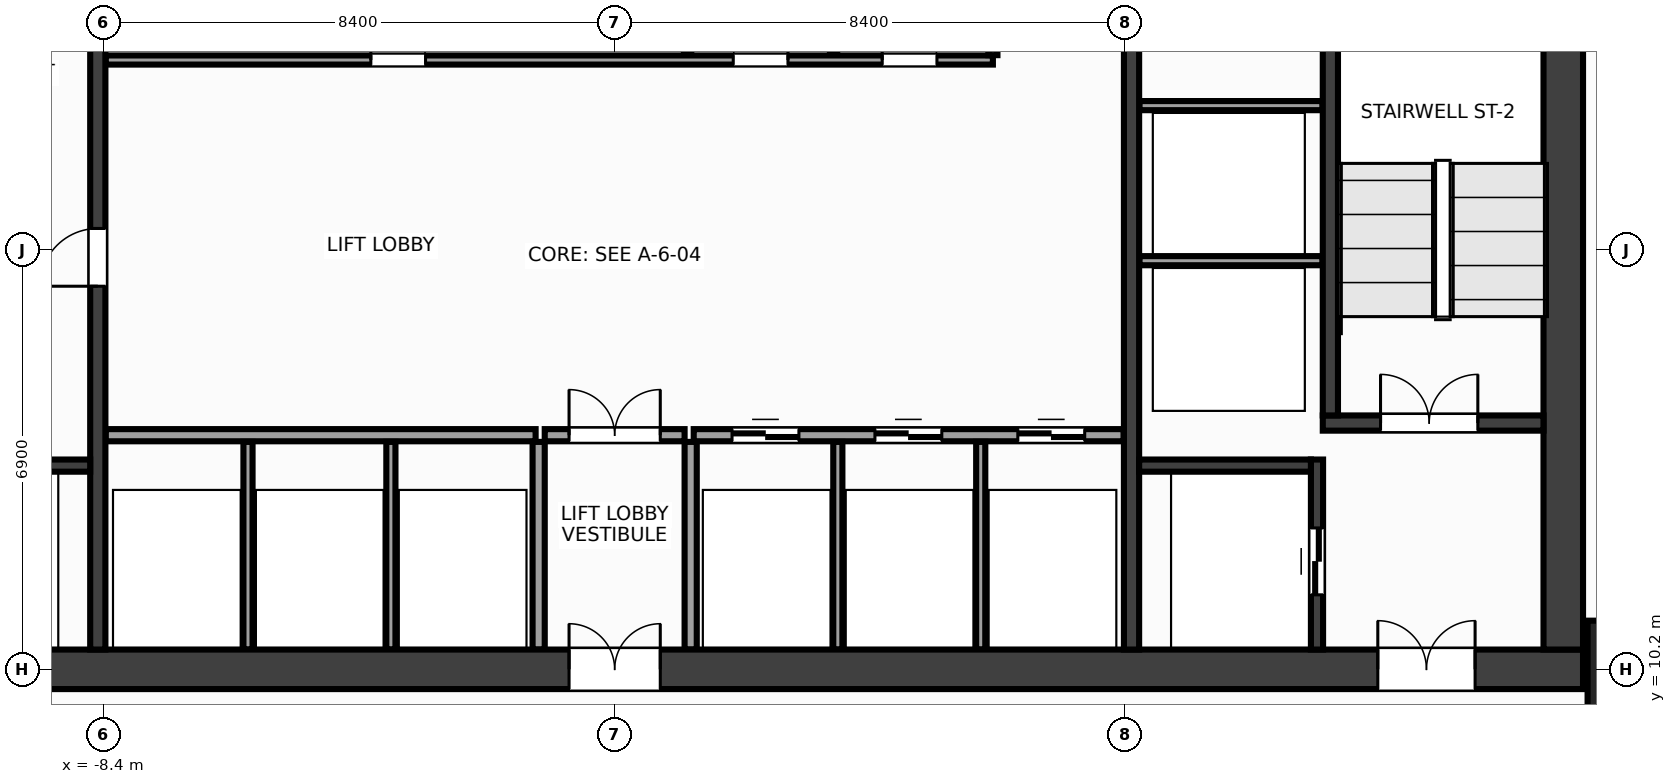
"""IFC4 building model, lengths in metres.
Left out: names, types, materials, properties, quantities, classifications, styles, units other than length and angle.
Written with IfcOpenShell. Run it as: python <this file> out.ifc"""

import sys

from ifc_helpers import new_model, si_unit, direction, frame, frame_2d, origin, origin_2d, place, context, subcontext, project, spatial, rectangle, extrude, source, transform, mapped, element, fill, save


model = new_model("IFC4")
c1 = context("Model", 3, precision=1e-05, world=origin(), true_north=direction((0.0, 1.0)))
c2 = subcontext(c1, "Body", "Model", "MODEL_VIEW")
j1 = project(units=[si_unit("LENGTHUNIT", "METRE"), si_unit("PLANEANGLEUNIT", "RADIAN")], contexts=[c1])
p1 = place(None, origin())
s1 = spatial("IfcSite", under=j1, at=p1, CompositionType="ELEMENT")
p2 = place(p1, origin())
s2 = spatial("IfcBuilding", under=s1, at=p2, CompositionType="ELEMENT")
p3 = place(p2, frame((0.0, 0.0, 81.2)))
s3 = spatial("IfcBuildingStorey", under=s2, at=p3, CompositionType="ELEMENT", Elevation=81.2)
m1 = source(origin(), c2, "Body", "SweptSolid", [
    extrude(rectangle(XDim=31.85, YDim=0.65, at=frame_2d((15.925, 0.0))), origin(), (0.0, 0.0, 1.0), 3.6),
])
p4 = place(p3, frame((-15.925, 10.2, 0.0), z_axis=(0.0, 0.0, 1.0), x_axis=(1.0, 0.0, 0.0)))
e1 = element("IfcWall", 1, at=p4, inside=s3, PredefinedType="SHEAR", context=c2, shape_type="MappedRepresentation", body=[
    mapped(m1, transform((0.0, 0.0, 0.0), x_axis=(1.0, 0.0, 0.0), y_axis=(0.0, 1.0, 0.0), z_axis=(0.0, 0.0, 1.0), scale=1.0)),
])
p5 = place(p4, frame((1.775, 0.0, 0.0)))
e2 = element("IfcOpeningElement", 2, at=p5, cuts=e1, PredefinedType="OPENING", context=c2, shape_type="SweptSolid", body=[
    extrude(rectangle(XDim=1.6, YDim=2.15, at=frame_2d((0.8, 1.075))), frame((0.0, 0.337, 0.0), z_axis=(0.0, -1.0, 0.0), x_axis=(1.0, 0.0, 0.0)), (0.0, 0.0, 1.0), 0.674),
])
p6 = place(p4, frame((28.475, 0.0, 0.0)))
e3 = element("IfcOpeningElement", 3, at=p6, cuts=e1, PredefinedType="OPENING", context=c2, shape_type="SweptSolid", body=[
    extrude(rectangle(XDim=1.6, YDim=2.15, at=frame_2d((0.8, 1.075))), frame((0.0, 0.337, 0.0), z_axis=(0.0, -1.0, 0.0), x_axis=(1.0, 0.0, 0.0)), (0.0, 0.0, 1.0), 0.674),
])
p7 = place(p4, frame((15.175, 0.0, 0.0)))
e4 = element("IfcOpeningElement", 4, at=p7, cuts=e1, PredefinedType="OPENING", context=c2, shape_type="SweptSolid", body=[
    extrude(rectangle(XDim=1.5, YDim=2.2, at=frame_2d((0.75, 1.1))), frame((0.0, 0.337, 0.0), z_axis=(0.0, -1.0, 0.0), x_axis=(1.0, 0.0, 0.0)), (0.0, 0.0, 1.0), 0.674),
])
m2 = source(origin(), c2, "Body", "SweptSolid", [
    extrude(rectangle(XDim=12.95, YDim=0.65, at=frame_2d((6.475, 0.0))), origin(), (0.0, 0.0, 1.0), 3.6),
])
p8 = place(p3, frame((15.6, 10.525, 0.0), z_axis=(0.0, 0.0, 1.0), x_axis=(0.0, 1.0, 0.0)))
e5 = element("IfcWall", 5, at=p8, inside=s3, PredefinedType="SHEAR", context=c2, shape_type="MappedRepresentation", body=[
    mapped(m2, transform((0.0, 0.0, 0.0), x_axis=(1.0, 0.0, 0.0), y_axis=(0.0, 1.0, 0.0), z_axis=(0.0, 0.0, 1.0), scale=1.0)),
])
m3 = source(origin(), c2, "Body", "SweptSolid", [
    extrude(rectangle(XDim=12.95, YDim=0.25, at=frame_2d((6.475, 0.0))), origin(), (0.0, 0.0, 1.0), 3.6),
])
p9 = place(p3, frame((-8.5, 10.525, 0.0), z_axis=(0.0, 0.0, 1.0), x_axis=(0.0, 1.0, 0.0)))
e6 = element("IfcWall", 6, at=p9, inside=s3, PredefinedType="SHEAR", context=c2, shape_type="MappedRepresentation", body=[
    mapped(m3, transform((0.0, 0.0, 0.0), x_axis=(1.0, 0.0, 0.0), y_axis=(0.0, 1.0, 0.0), z_axis=(0.0, 0.0, 1.0), scale=1.0)),
])
p10 = place(p9, frame((5.975, 0.0, 0.0)))
e7 = element("IfcOpeningElement", 7, at=p10, cuts=e6, PredefinedType="OPENING", context=c2, shape_type="SweptSolid", body=[
    extrude(rectangle(XDim=0.95, YDim=2.15, at=frame_2d((0.475, 1.075))), frame((0.0, 0.137, 0.0), z_axis=(0.0, -1.0, 0.0), x_axis=(1.0, 0.0, 0.0)), (0.0, 0.0, 1.0), 0.274),
])
p11 = place(p3, frame((8.5, 10.525, 0.0), z_axis=(0.0, 0.0, 1.0), x_axis=(0.0, 1.0, 0.0)))
e8 = element("IfcWall", 8, at=p11, inside=s3, PredefinedType="SHEAR", context=c2, shape_type="MappedRepresentation", body=[
    mapped(m3, transform((0.0, 0.0, 0.0), x_axis=(1.0, 0.0, 0.0), y_axis=(0.0, 1.0, 0.0), z_axis=(0.0, 0.0, 1.0), scale=1.0)),
])
p12 = place(p11, frame((9.925, 0.0, 0.0)))
e9 = element("IfcOpeningElement", 9, at=p12, cuts=e8, PredefinedType="OPENING", context=c2, shape_type="SweptSolid", body=[
    extrude(rectangle(XDim=0.95, YDim=2.15, at=frame_2d((0.475, 1.075))), frame((0.0, 0.137, 0.0), z_axis=(0.0, -1.0, 0.0), x_axis=(1.0, 0.0, 0.0)), (0.0, 0.0, 1.0), 0.274),
])
m4 = source(origin(), c2, "Body", "SweptSolid", [
    extrude(rectangle(XDim=3.63, YDim=0.25, at=frame_2d((1.815, 0.0))), origin(), (0.0, 0.0, 1.0), 3.6),
])
p13 = place(p3, frame((11.645, 14.25, 0.0), z_axis=(0.0, 0.0, 1.0), x_axis=(1.0, 0.0, 0.0)))
e10 = element("IfcWall", 10, at=p13, inside=s3, PredefinedType="SHEAR", context=c2, shape_type="MappedRepresentation", body=[
    mapped(m4, transform((0.0, 0.0, 0.0), x_axis=(1.0, 0.0, 0.0), y_axis=(0.0, 1.0, 0.0), z_axis=(0.0, 0.0, 1.0), scale=1.0)),
])
p14 = place(p13, frame((0.95, 0.0, 0.0)))
e11 = element("IfcOpeningElement", 11, at=p14, cuts=e10, PredefinedType="OPENING", context=c2, shape_type="SweptSolid", body=[
    extrude(rectangle(XDim=1.6, YDim=2.15, at=frame_2d((0.8, 1.075))), frame((0.0, 0.137, 0.0), z_axis=(0.0, -1.0, 0.0), x_axis=(1.0, 0.0, 0.0)), (0.0, 0.0, 1.0), 0.274),
])
m5 = source(origin(), c2, "Body", "SweptSolid", [
    extrude(rectangle(XDim=9.1, YDim=0.25, at=frame_2d((4.55, 0.0))), origin(), (0.0, 0.0, 1.0), 3.6),
])
p15 = place(p3, frame((11.77, 14.375, 0.0), z_axis=(0.0, 0.0, 1.0), x_axis=(0.0, 1.0, 0.0)))
e12 = element("IfcWall", 12, at=p15, inside=s3, PredefinedType="SHEAR", context=c2, shape_type="MappedRepresentation", body=[
    mapped(m5, transform((0.0, 0.0, 0.0), x_axis=(1.0, 0.0, 0.0), y_axis=(0.0, 1.0, 0.0), z_axis=(0.0, 0.0, 1.0), scale=1.0)),
])
m6 = source(origin(), c2, "Body", "SweptSolid", [
    extrude(rectangle(XDim=2.825, YDim=0.2, at=frame_2d((1.413, 0.0))), origin(), (0.0, 0.0, 1.0), 3.6),
])
p16 = place(p3, frame((-11.45, 13.55, 0.0), z_axis=(0.0, 0.0, 1.0), x_axis=(1.0, 0.0, 0.0)))
e13 = element("IfcWall", 13, at=p16, inside=s3, PredefinedType="SHEAR", context=c2, shape_type="MappedRepresentation", body=[
    mapped(m6, transform((0.0, 0.0, 0.0), x_axis=(1.0, 0.0, 0.0), y_axis=(0.0, 1.0, 0.0), z_axis=(0.0, 0.0, 1.0), scale=1.0)),
])
m7 = source(origin(), c2, "Body", "SweptSolid", [
    extrude(rectangle(XDim=3.125, YDim=0.2, at=frame_2d((1.562, 0.0))), origin(), (0.0, 0.0, 1.0), 3.6),
])
p17 = place(p3, frame((11.55, 10.525, 0.0), z_axis=(0.0, 0.0, 1.0), x_axis=(0.0, 1.0, 0.0)))
e14 = element("IfcWall", 14, at=p17, inside=s3, PredefinedType="SHEAR", context=c2, shape_type="MappedRepresentation", body=[
    mapped(m7, transform((0.0, 0.0, 0.0), x_axis=(1.0, 0.0, 0.0), y_axis=(0.0, 1.0, 0.0), z_axis=(0.0, 0.0, 1.0), scale=1.0)),
])
p18 = place(p17, frame((0.9, 0.0, 0.0)))
e15 = element("IfcOpeningElement", 15, at=p18, cuts=e14, PredefinedType="OPENING", context=c2, shape_type="SweptSolid", body=[
    extrude(rectangle(XDim=1.1, YDim=2.15, at=frame_2d((0.55, 1.075))), frame((0.0, 0.112, 0.0), z_axis=(0.0, -1.0, 0.0), x_axis=(1.0, 0.0, 0.0)), (0.0, 0.0, 1.0), 0.224),
])
p19 = place(p3, frame((8.625, 13.55, 0.0), z_axis=(0.0, 0.0, 1.0), x_axis=(1.0, 0.0, 0.0)))
e16 = element("IfcWall", 16, at=p19, inside=s3, PredefinedType="SHEAR", context=c2, shape_type="MappedRepresentation", body=[
    mapped(m6, transform((0.0, 0.0, 0.0), x_axis=(1.0, 0.0, 0.0), y_axis=(0.0, 1.0, 0.0), z_axis=(0.0, 0.0, 1.0), scale=1.0)),
])
m8 = source(origin(), c2, "Body", "SweptSolid", [
    extrude(rectangle(XDim=1.6, YDim=1.6, at=origin_2d()), origin(), (0.0, 0.0, 1.0), 3.6),
])
p20 = place(p3, frame((16.8, 10.2, 0.0), z_axis=(0.0, 0.0, 1.0), x_axis=(1.0, 0.0, 0.0)))
e17 = element("IfcColumn", 17, at=p20, inside=s3, PredefinedType="COLUMN", context=c2, shape_type="MappedRepresentation", body=[
    mapped(m8, transform((0.0, 0.0, 0.0), x_axis=(1.0, 0.0, 0.0), y_axis=(0.0, 1.0, 0.0), z_axis=(0.0, 0.0, 1.0), scale=1.0)),
])
m9 = source(origin(), c2, "Body", "SweptSolid", [
    extrude(rectangle(XDim=3.01, YDim=0.15, at=frame_2d((1.505, 0.0))), origin(), (0.0, 0.0, 1.0), 3.36),
])
for number, where, z_axis, x_axis in (
    (18, (8.63, 16.92, 0.0), (0.0, 0.0, 1.0), (1.0, 0.0, 0.0)),
    (19, (8.63, 19.47, 0.0), (0.0, 0.0, 1.0), (1.0, 0.0, 0.0)),
):
    element("IfcWall", number, at=place(p3, frame(where, z_axis=z_axis, x_axis=x_axis)), inside=s3, PredefinedType="PARTITIONING", context=c2, shape_type="MappedRepresentation", body=[
        mapped(m9, transform((0.0, 0.0, 0.0), x_axis=(1.0, 0.0, 0.0), y_axis=(0.0, 1.0, 0.0), z_axis=(0.0, 0.0, 1.0), scale=1.0)),
    ])
m10 = source(origin(), c2, "Body", "SweptSolid", [
    extrude(rectangle(XDim=7.07, YDim=0.2, at=frame_2d((3.535, 0.0))), origin(), (0.0, 0.0, 1.0), 3.36),
])
p21 = place(p3, frame((-8.37, 14.05, 0.0), z_axis=(0.0, 0.0, 1.0), x_axis=(1.0, 0.0, 0.0)))
e20 = element("IfcWall", 20, at=p21, inside=s3, PredefinedType="PARTITIONING", context=c2, shape_type="MappedRepresentation", body=[
    mapped(m10, transform((0.0, 0.0, 0.0), x_axis=(1.0, 0.0, 0.0), y_axis=(0.0, 1.0, 0.0), z_axis=(0.0, 0.0, 1.0), scale=1.0)),
])
p22 = place(p3, frame((1.3, 14.05, 0.0), z_axis=(0.0, 0.0, 1.0), x_axis=(1.0, 0.0, 0.0)))
e21 = element("IfcWall", 21, at=p22, inside=s3, PredefinedType="PARTITIONING", context=c2, shape_type="MappedRepresentation", body=[
    mapped(m10, transform((0.0, 0.0, 0.0), x_axis=(1.0, 0.0, 0.0), y_axis=(0.0, 1.0, 0.0), z_axis=(0.0, 0.0, 1.0), scale=1.0)),
])
p23 = place(p22, frame((0.63, 0.0, 0.0)))
e22 = element("IfcOpeningElement", 22, at=p23, cuts=e21, PredefinedType="OPENING", context=c2, shape_type="SweptSolid", body=[
    extrude(rectangle(XDim=1.1, YDim=2.15, at=frame_2d((0.55, 1.075))), frame((0.0, 0.112, 0.0), z_axis=(0.0, -1.0, 0.0), x_axis=(1.0, 0.0, 0.0)), (0.0, 0.0, 1.0), 0.224),
])
p24 = place(p22, frame((2.98, 0.0, 0.0)))
e23 = element("IfcOpeningElement", 23, at=p24, cuts=e21, PredefinedType="OPENING", context=c2, shape_type="SweptSolid", body=[
    extrude(rectangle(XDim=1.1, YDim=2.15, at=frame_2d((0.55, 1.075))), frame((0.0, 0.112, 0.0), z_axis=(0.0, -1.0, 0.0), x_axis=(1.0, 0.0, 0.0)), (0.0, 0.0, 1.0), 0.224),
])
p25 = place(p22, frame((5.33, 0.0, 0.0)))
e24 = element("IfcOpeningElement", 24, at=p25, cuts=e21, PredefinedType="OPENING", context=c2, shape_type="SweptSolid", body=[
    extrude(rectangle(XDim=1.1, YDim=2.15, at=frame_2d((0.55, 1.075))), frame((0.0, 0.112, 0.0), z_axis=(0.0, -1.0, 0.0), x_axis=(1.0, 0.0, 0.0)), (0.0, 0.0, 1.0), 0.224),
])
m11 = source(origin(), c2, "Body", "SweptSolid", [
    extrude(rectangle(XDim=3.415, YDim=0.2, at=frame_2d((1.708, 0.0))), origin(), (0.0, 0.0, 1.0), 3.36),
])
for number, where, z_axis, x_axis in (
    (25, (-1.25, 10.525, 0.0), (0.0, 0.0, 1.0), (0.0, 1.0, 0.0)),
    (26, (1.25, 10.525, 0.0), (0.0, 0.0, 1.0), (0.0, 1.0, 0.0)),
):
    element("IfcWall", number, at=place(p3, frame(where, z_axis=z_axis, x_axis=x_axis)), inside=s3, PredefinedType="PARTITIONING", context=c2, shape_type="MappedRepresentation", body=[
        mapped(m11, transform((0.0, 0.0, 0.0), x_axis=(1.0, 0.0, 0.0), y_axis=(0.0, 1.0, 0.0), z_axis=(0.0, 0.0, 1.0), scale=1.0)),
    ])
m12 = source(origin(), c2, "Body", "SweptSolid", [
    extrude(rectangle(XDim=2.3, YDim=0.2, at=frame_2d((1.15, 0.0))), origin(), (0.0, 0.0, 1.0), 3.36),
])
p26 = place(p3, frame((-1.15, 14.05, 0.0), z_axis=(0.0, 0.0, 1.0), x_axis=(1.0, 0.0, 0.0)))
e27 = element("IfcWall", 27, at=p26, inside=s3, PredefinedType="PARTITIONING", context=c2, shape_type="MappedRepresentation", body=[
    mapped(m12, transform((0.0, 0.0, 0.0), x_axis=(1.0, 0.0, 0.0), y_axis=(0.0, 1.0, 0.0), z_axis=(0.0, 0.0, 1.0), scale=1.0)),
])
p27 = place(p26, frame((0.4, 0.0, 0.0)))
e28 = element("IfcOpeningElement", 28, at=p27, cuts=e27, PredefinedType="OPENING", context=c2, shape_type="SweptSolid", body=[
    extrude(rectangle(XDim=1.5, YDim=2.2, at=frame_2d((0.75, 1.1))), frame((0.0, 0.112, 0.0), z_axis=(0.0, -1.0, 0.0), x_axis=(1.0, 0.0, 0.0)), (0.0, 0.0, 1.0), 0.224),
])
m13 = source(origin(), c2, "Body", "SweptSolid", [
    extrude(rectangle(XDim=14.59, YDim=0.15, at=frame_2d((7.295, 0.0))), origin(), (0.0, 0.0, 1.0), 3.36),
])
p28 = place(p3, frame((-8.37, 20.22, 0.0), z_axis=(0.0, 0.0, 1.0), x_axis=(1.0, 0.0, 0.0)))
e29 = element("IfcWall", 29, at=p28, inside=s3, PredefinedType="PARTITIONING", context=c2, shape_type="MappedRepresentation", body=[
    mapped(m13, transform((0.0, 0.0, 0.0), x_axis=(1.0, 0.0, 0.0), y_axis=(0.0, 1.0, 0.0), z_axis=(0.0, 0.0, 1.0), scale=1.0)),
])
p29 = place(p28, frame((4.36, 0.0, 0.0)))
e30 = element("IfcOpeningElement", 30, at=p29, cuts=e29, PredefinedType="OPENING", context=c2, shape_type="SweptSolid", body=[
    extrude(rectangle(XDim=0.9, YDim=2.15, at=frame_2d((0.45, 1.075))), frame((0.0, 0.087, 0.0), z_axis=(0.0, -1.0, 0.0), x_axis=(1.0, 0.0, 0.0)), (0.0, 0.0, 1.0), 0.174),
])
p30 = place(p28, frame((10.32, 0.0, 0.0)))
e31 = element("IfcOpeningElement", 31, at=p30, cuts=e29, PredefinedType="OPENING", context=c2, shape_type="SweptSolid", body=[
    extrude(rectangle(XDim=0.9, YDim=2.15, at=frame_2d((0.45, 1.075))), frame((0.0, 0.087, 0.0), z_axis=(0.0, -1.0, 0.0), x_axis=(1.0, 0.0, 0.0)), (0.0, 0.0, 1.0), 0.174),
])
p31 = place(p28, frame((12.77, 0.0, 0.0)))
e32 = element("IfcOpeningElement", 32, at=p31, cuts=e29, PredefinedType="OPENING", context=c2, shape_type="SweptSolid", body=[
    extrude(rectangle(XDim=0.9, YDim=2.15, at=frame_2d((0.45, 1.075))), frame((0.0, 0.087, 0.0), z_axis=(0.0, -1.0, 0.0), x_axis=(1.0, 0.0, 0.0)), (0.0, 0.0, 1.0), 0.174),
])
m14 = source(origin(), c2, "Body", "SweptSolid", [
    extrude(rectangle(XDim=1.55, YDim=0.15, at=frame_2d((0.775, 0.0))), origin(), (0.0, 0.0, 1.0), 3.36),
])
p32 = place(p3, frame((6.22, 20.3, 0.0), z_axis=(0.0, 0.0, 1.0), x_axis=(0.0, 1.0, 0.0)))
e33 = element("IfcWall", 33, at=p32, inside=s3, PredefinedType="PARTITIONING", context=c2, shape_type="MappedRepresentation", body=[
    mapped(m14, transform((0.0, 0.0, 0.0), x_axis=(1.0, 0.0, 0.0), y_axis=(0.0, 1.0, 0.0), z_axis=(0.0, 0.0, 1.0), scale=1.0)),
])
m15 = source(origin(), c2, "Body", "SweptSolid", [
    extrude(rectangle(XDim=3.415, YDim=0.15, at=frame_2d((1.708, 0.0))), origin(), (0.0, 0.0, 1.0), 3.36),
])
for number, where, z_axis, x_axis in (
    (34, (-6.03, 10.525, 0.0), (0.0, 0.0, 1.0), (0.0, 1.0, 0.0)),
    (35, (-3.68, 10.525, 0.0), (0.0, 0.0, 1.0), (0.0, 1.0, 0.0)),
    (36, (3.67, 10.525, 0.0), (0.0, 0.0, 1.0), (0.0, 1.0, 0.0)),
    (37, (6.02, 10.525, 0.0), (0.0, 0.0, 1.0), (0.0, 1.0, 0.0)),
):
    element("IfcWall", number, at=place(p3, frame(where, z_axis=z_axis, x_axis=x_axis)), inside=s3, PredefinedType="PARTITIONING", context=c2, shape_type="MappedRepresentation", body=[
        mapped(m15, transform((0.0, 0.0, 0.0), x_axis=(1.0, 0.0, 0.0), y_axis=(0.0, 1.0, 0.0), z_axis=(0.0, 0.0, 1.0), scale=1.0)),
    ])
m16 = source(origin(), c2, "Body", "SweptSolid", [
    extrude(rectangle(XDim=3.115, YDim=0.12, at=frame_2d((1.558, 0.0))), origin(), (0.0, 0.0, 1.0), 3.36),
])
for number, where, z_axis, x_axis in (
    (38, (1.2, 20.32, 0.0), (0.0, 0.0, 1.0), (0.0, 1.0, 0.0)),
    (39, (3.6, 20.32, 0.0), (0.0, 0.0, 1.0), (0.0, 1.0, 0.0)),
):
    element("IfcWall", number, at=place(p3, frame(where, z_axis=z_axis, x_axis=x_axis)), inside=s3, PredefinedType="PARTITIONING", context=c2, shape_type="MappedRepresentation", body=[
        mapped(m16, transform((0.0, 0.0, 0.0), x_axis=(1.0, 0.0, 0.0), y_axis=(0.0, 1.0, 0.0), z_axis=(0.0, 0.0, 1.0), scale=1.0)),
    ])
m17 = source(origin(), c2, "Body", "SweptSolid", [
    extrude(rectangle(XDim=1.6, YDim=2.15, at=frame_2d((0.8, 1.075))), frame((0.0, 0.025, 0.0), z_axis=(0.0, -1.0, 0.0), x_axis=(1.0, 0.0, 0.0)), (0.0, 0.0, 1.0), 0.05),
])
p33 = place(p14, origin())
e40 = element("IfcDoor", 40, at=p33, inside=s3, OperationType="DOUBLE_DOOR_SINGLE_SWING", PredefinedType="DOOR", context=c2, shape_type="MappedRepresentation", body=[
    mapped(m17, transform((0.0, 0.0, 0.0), x_axis=(1.0, 0.0, 0.0), y_axis=(0.0, 1.0, 0.0), z_axis=(0.0, 0.0, 1.0), scale=1.0)),
])
fill(e11, e40)
p34 = place(p6, origin())
e41 = element("IfcDoor", 41, at=p34, inside=s3, OperationType="DOUBLE_DOOR_SINGLE_SWING", PredefinedType="DOOR", context=c2, shape_type="MappedRepresentation", body=[
    mapped(m17, transform((0.0, 0.0, 0.0), x_axis=(1.0, 0.0, 0.0), y_axis=(0.0, 1.0, 0.0), z_axis=(0.0, 0.0, 1.0), scale=1.0)),
])
fill(e3, e41)
m18 = source(origin(), c2, "Body", "SweptSolid", [
    extrude(rectangle(XDim=1.1, YDim=2.15, at=frame_2d((0.55, 1.075))), frame((0.0, 0.025, 0.0), z_axis=(0.0, -1.0, 0.0), x_axis=(1.0, 0.0, 0.0)), (0.0, 0.0, 1.0), 0.05),
])
p35 = place(p18, origin())
e42 = element("IfcDoor", 42, at=p35, inside=s3, OperationType="DOUBLE_DOOR_SLIDING", PredefinedType="DOOR", context=c2, shape_type="MappedRepresentation", body=[
    mapped(m18, transform((0.0, 0.0, 0.0), x_axis=(1.0, 0.0, 0.0), y_axis=(0.0, 1.0, 0.0), z_axis=(0.0, 0.0, 1.0), scale=1.0)),
])
fill(e15, e42)
m19 = source(origin(), c2, "Body", "SweptSolid", [
    extrude(rectangle(XDim=0.95, YDim=2.15, at=frame_2d((0.475, 1.075))), frame((0.0, 0.025, 0.0), z_axis=(0.0, -1.0, 0.0), x_axis=(1.0, 0.0, 0.0)), (0.0, 0.0, 1.0), 0.05),
])
p36 = place(p10, origin())
e43 = element("IfcDoor", 43, at=p36, inside=s3, OperationType="SINGLE_SWING_LEFT", PredefinedType="DOOR", context=c2, shape_type="MappedRepresentation", body=[
    mapped(m19, transform((0.0, 0.0, 0.0), x_axis=(1.0, 0.0, 0.0), y_axis=(0.0, 1.0, 0.0), z_axis=(0.0, 0.0, 1.0), scale=1.0)),
])
fill(e7, e43)
p37 = place(p23, origin())
e44 = element("IfcDoor", 44, at=p37, inside=s3, OperationType="DOUBLE_DOOR_SLIDING", PredefinedType="DOOR", context=c2, shape_type="MappedRepresentation", body=[
    mapped(m18, transform((0.0, 0.0, 0.0), x_axis=(1.0, 0.0, 0.0), y_axis=(0.0, 1.0, 0.0), z_axis=(0.0, 0.0, 1.0), scale=1.0)),
])
fill(e22, e44)
p38 = place(p24, origin())
e45 = element("IfcDoor", 45, at=p38, inside=s3, OperationType="DOUBLE_DOOR_SLIDING", PredefinedType="DOOR", context=c2, shape_type="MappedRepresentation", body=[
    mapped(m18, transform((0.0, 0.0, 0.0), x_axis=(1.0, 0.0, 0.0), y_axis=(0.0, 1.0, 0.0), z_axis=(0.0, 0.0, 1.0), scale=1.0)),
])
fill(e23, e45)
p39 = place(p25, origin())
e46 = element("IfcDoor", 46, at=p39, inside=s3, OperationType="DOUBLE_DOOR_SLIDING", PredefinedType="DOOR", context=c2, shape_type="MappedRepresentation", body=[
    mapped(m18, transform((0.0, 0.0, 0.0), x_axis=(1.0, 0.0, 0.0), y_axis=(0.0, 1.0, 0.0), z_axis=(0.0, 0.0, 1.0), scale=1.0)),
])
fill(e24, e46)
m20 = source(origin(), c2, "Body", "SweptSolid", [
    extrude(rectangle(XDim=1.5, YDim=2.2, at=frame_2d((0.75, 1.1))), frame((0.0, 0.025, 0.0), z_axis=(0.0, -1.0, 0.0), x_axis=(1.0, 0.0, 0.0)), (0.0, 0.0, 1.0), 0.05),
])
p40 = place(p27, origin())
e47 = element("IfcDoor", 47, at=p40, inside=s3, OperationType="DOUBLE_DOOR_SINGLE_SWING", PredefinedType="DOOR", context=c2, shape_type="MappedRepresentation", body=[
    mapped(m20, transform((0.0, 0.0, 0.0), x_axis=(1.0, 0.0, 0.0), y_axis=(0.0, 1.0, 0.0), z_axis=(0.0, 0.0, 1.0), scale=1.0)),
])
fill(e28, e47)
p41 = place(p7, origin())
e48 = element("IfcDoor", 48, at=p41, inside=s3, OperationType="DOUBLE_DOOR_SINGLE_SWING", PredefinedType="DOOR", context=c2, shape_type="MappedRepresentation", body=[
    mapped(m20, transform((0.0, 0.0, 0.0), x_axis=(1.0, 0.0, 0.0), y_axis=(0.0, 1.0, 0.0), z_axis=(0.0, 0.0, 1.0), scale=1.0)),
])
fill(e4, e48)
m21 = source(origin(), c2, "Body", "SweptSolid", [
    extrude(rectangle(XDim=0.9, YDim=2.15, at=frame_2d((0.45, 1.075))), frame((0.0, 0.025, 0.0), z_axis=(0.0, -1.0, 0.0), x_axis=(1.0, 0.0, 0.0)), (0.0, 0.0, 1.0), 0.05),
])
p42 = place(p29, origin())
e49 = element("IfcDoor", 49, at=p42, inside=s3, OperationType="SINGLE_SWING_LEFT", PredefinedType="DOOR", context=c2, shape_type="MappedRepresentation", body=[
    mapped(m21, transform((0.0, 0.0, 0.0), x_axis=(1.0, 0.0, 0.0), y_axis=(0.0, 1.0, 0.0), z_axis=(0.0, 0.0, 1.0), scale=1.0)),
])
fill(e30, e49)
p43 = place(p30, origin())
e50 = element("IfcDoor", 50, at=p43, inside=s3, OperationType="SINGLE_SWING_RIGHT", PredefinedType="DOOR", context=c2, shape_type="MappedRepresentation", body=[
    mapped(m21, transform((0.0, 0.0, 0.0), x_axis=(1.0, 0.0, 0.0), y_axis=(0.0, 1.0, 0.0), z_axis=(0.0, 0.0, 1.0), scale=1.0)),
])
fill(e31, e50)
p44 = place(p31, origin())
e51 = element("IfcDoor", 51, at=p44, inside=s3, OperationType="SINGLE_SWING_LEFT", PredefinedType="DOOR", context=c2, shape_type="MappedRepresentation", body=[
    mapped(m21, transform((0.0, 0.0, 0.0), x_axis=(1.0, 0.0, 0.0), y_axis=(0.0, 1.0, 0.0), z_axis=(0.0, 0.0, 1.0), scale=1.0)),
])
fill(e32, e51)
save(model, sys.argv[1])
